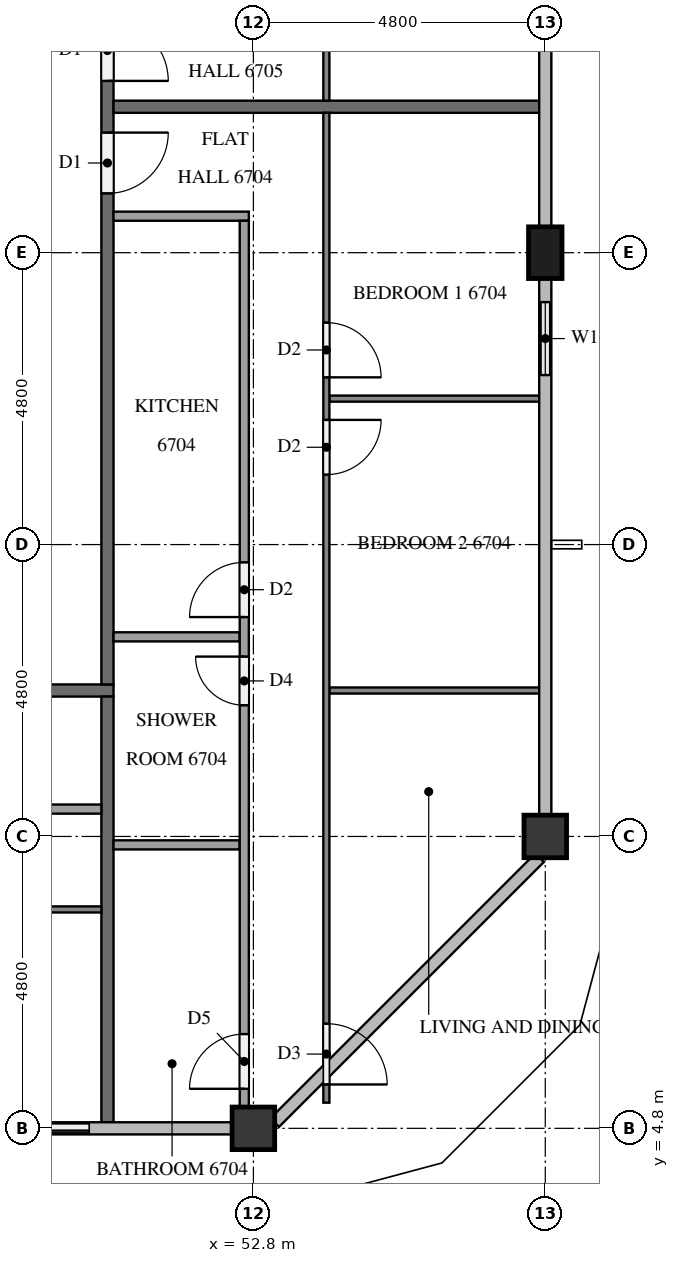
"""IFC4 building model, lengths in metres.
Left out: names, types, materials, properties, quantities, classifications, styles, units other than length and angle.
Written with IfcOpenShell. Run it as: python <this file> out.ifc"""

import sys

from ifc_helpers import new_model, si_unit, direction, frame, frame_2d, origin, origin_2d, place, context, subcontext, project, spatial, rectangle, extrude, element, fill, save


model = new_model("IFC4")
c1 = context("Model", 3, precision=1e-05, world=origin(), true_north=direction((0.0, 1.0)))
c2 = subcontext(c1, "Body", "Model", "MODEL_VIEW")
j1 = project(units=[si_unit("LENGTHUNIT", "METRE"), si_unit("PLANEANGLEUNIT", "RADIAN")], contexts=[c1])
p1 = place(None, origin())
s1 = spatial("IfcSite", under=j1, at=p1, CompositionType="ELEMENT")
p2 = place(p1, origin())
s2 = spatial("IfcBuilding", under=s1, at=p2, CompositionType="ELEMENT")
p3 = place(p2, frame((0.0, 0.0, 256.2)))
s3 = spatial("IfcBuildingStorey", under=s2, at=p3, CompositionType="ELEMENT", Elevation=256.2)
for number, where, z_axis, x_axis in (
    (1, (52.8, 4.8, 0.0), (0.0, 0.0, 1.0), (1.0, 0.0, 0.0)),
    (2, (57.6, 9.6, 0.0), (0.0, 0.0, 1.0), (1.0, 0.0, 0.0)),
):
    element("IfcColumn", number, at=place(p3, frame(where, z_axis=z_axis, x_axis=x_axis)), inside=s3, PredefinedType="COLUMN", context=c2, shape_type="SweptSolid", body=[
        extrude(rectangle(XDim=0.7, YDim=0.7, at=origin_2d()), origin(), (0.0, 0.0, 1.0), 3.2),
    ])
p4 = place(p3, frame((57.6, 19.2, 0.0), z_axis=(0.0, 0.0, 1.0), x_axis=(0.0, 1.0, 0.0)))
e3 = element("IfcColumn", 3, at=p4, inside=s3, PredefinedType="COLUMN", context=c2, shape_type="SweptSolid", body=[
    extrude(rectangle(XDim=0.85, YDim=0.55, at=origin_2d()), origin(), (0.0, 0.0, 1.0), 3.2),
])
p5 = place(p3, frame((48.0, 4.8, 0.0), z_axis=(0.0, 0.0, 1.0), x_axis=(1.0, 0.0, 0.0)))
e4 = element("IfcWall", 4, at=p5, inside=s3, PredefinedType="SOLIDWALL", context=c2, shape_type="SweptSolid", body=[
    extrude(rectangle(XDim=2.4, YDim=0.15, at=frame_2d((1.2, 0.0))), origin(), (0.0, 0.0, 1.0), 3.2),
])
p6 = place(p5, frame((0.3, 0.0, 0.0)))
e5 = element("IfcOpeningElement", 5, at=p6, cuts=e4, PredefinedType="OPENING", context=c2, shape_type="SweptSolid", body=[
    extrude(rectangle(XDim=1.8, YDim=2.4, at=frame_2d((0.9, 1.2))), frame((0.0, 0.085, 0.0), z_axis=(0.0, -1.0, 0.0), x_axis=(1.0, 0.0, 0.0)), (0.0, 0.0, 1.0), 0.17),
])
p7 = place(p3, frame((57.6, 16.8, 0.0), z_axis=(0.0, 0.0, 1.0), x_axis=(0.0, 1.0, 0.0)))
e6 = element("IfcWall", 6, at=p7, inside=s3, PredefinedType="SOLIDWALL", context=c2, shape_type="SweptSolid", body=[
    extrude(rectangle(XDim=1.975, YDim=0.15, at=frame_2d((0.987, 0.0))), origin(), (0.0, 0.0, 1.0), 3.2),
])
p8 = place(p7, frame((0.387, 0.0, 0.9)))
e7 = element("IfcOpeningElement", 7, at=p8, cuts=e6, PredefinedType="OPENING", context=c2, shape_type="SweptSolid", body=[
    extrude(rectangle(XDim=1.2, YDim=1.4, at=frame_2d((0.6, 0.7))), frame((0.0, 0.085, 0.0), z_axis=(0.0, -1.0, 0.0), x_axis=(1.0, 0.0, 0.0)), (0.0, 0.0, 1.0), 0.17),
])
p9 = place(p3, frame((50.5, 12.0, 0.0), z_axis=(0.0, 0.0, 1.0), x_axis=(-1.0, 0.0, 0.0)))
e8 = element("IfcWall", 8, at=p9, inside=s3, PredefinedType="PARTITIONING", context=c2, shape_type="SweptSolid", body=[
    extrude(rectangle(XDim=38.6, YDim=0.2, at=frame_2d((19.3, 0.0))), origin(), (0.0, 0.0, 1.0), 3.2),
])
p10 = place(p9, frame((37.075, 0.0, 0.0)))
e9 = element("IfcOpeningElement", 9, at=p10, cuts=e8, PredefinedType="OPENING", context=c2, shape_type="SweptSolid", body=[
    extrude(rectangle(XDim=1.0, YDim=2.1, at=frame_2d((0.5, 1.05))), frame((0.0, 0.11, 0.0), z_axis=(0.0, -1.0, 0.0), x_axis=(1.0, 0.0, 0.0)), (0.0, 0.0, 1.0), 0.22),
])
p11 = place(p9, frame((12.525, 0.0, 0.0)))
e10 = element("IfcOpeningElement", 10, at=p11, cuts=e8, PredefinedType="OPENING", context=c2, shape_type="SweptSolid", body=[
    extrude(rectangle(XDim=1.0, YDim=2.1, at=frame_2d((0.5, 1.05))), frame((0.0, 0.11, 0.0), z_axis=(0.0, -1.0, 0.0), x_axis=(1.0, 0.0, 0.0)), (0.0, 0.0, 1.0), 0.22),
])
p12 = place(p9, frame((10.675, 0.0, 0.0)))
e11 = element("IfcOpeningElement", 11, at=p12, cuts=e8, PredefinedType="OPENING", context=c2, shape_type="SweptSolid", body=[
    extrude(rectangle(XDim=1.0, YDim=2.1, at=frame_2d((0.5, 1.05))), frame((0.0, 0.11, 0.0), z_axis=(0.0, -1.0, 0.0), x_axis=(1.0, 0.0, 0.0)), (0.0, 0.0, 1.0), 0.22),
])
p13 = place(p3, frame((50.4, 40.7, 0.0), z_axis=(0.0, 0.0, 1.0), x_axis=(0.0, -1.0, 0.0)))
e12 = element("IfcWall", 12, at=p13, inside=s3, PredefinedType="PARTITIONING", context=c2, shape_type="SweptSolid", body=[
    extrude(rectangle(XDim=28.6, YDim=0.2, at=frame_2d((14.3, 0.0))), origin(), (0.0, 0.0, 1.0), 3.2),
])
p14 = place(p13, frame((19.525, 0.0, 0.0)))
e13 = element("IfcOpeningElement", 13, at=p14, cuts=e12, PredefinedType="OPENING", context=c2, shape_type="SweptSolid", body=[
    extrude(rectangle(XDim=1.0, YDim=2.1, at=frame_2d((0.5, 1.05))), frame((0.0, 0.11, 0.0), z_axis=(0.0, -1.0, 0.0), x_axis=(1.0, 0.0, 0.0)), (0.0, 0.0, 1.0), 0.22),
])
p15 = place(p13, frame((17.675, 0.0, 0.0)))
e14 = element("IfcOpeningElement", 14, at=p15, cuts=e12, PredefinedType="OPENING", context=c2, shape_type="SweptSolid", body=[
    extrude(rectangle(XDim=1.0, YDim=2.1, at=frame_2d((0.5, 1.05))), frame((0.0, 0.11, 0.0), z_axis=(0.0, -1.0, 0.0), x_axis=(1.0, 0.0, 0.0)), (0.0, 0.0, 1.0), 0.22),
])
p16 = place(p13, frame((0.325, 0.0, 0.0)))
e15 = element("IfcOpeningElement", 15, at=p16, cuts=e12, PredefinedType="OPENING", context=c2, shape_type="SweptSolid", body=[
    extrude(rectangle(XDim=1.0, YDim=2.1, at=frame_2d((0.5, 1.05))), frame((0.0, 0.11, 0.0), z_axis=(0.0, -1.0, 0.0), x_axis=(1.0, 0.0, 0.0)), (0.0, 0.0, 1.0), 0.22),
])
for number, where, z_axis, x_axis in (
    (16, (50.4, 11.9, 0.0), (0.0, 0.0, 1.0), (0.0, -1.0, 0.0)),
    (17, (50.5, 21.6, 0.0), (0.0, 0.0, 1.0), (1.0, 0.0, 0.0)),
):
    element("IfcWall", number, at=place(p3, frame(where, z_axis=z_axis, x_axis=x_axis)), inside=s3, PredefinedType="PARTITIONING", context=c2, shape_type="SweptSolid", body=[
        extrude(rectangle(XDim=7.0, YDim=0.2, at=frame_2d((3.5, 0.0))), origin(), (0.0, 0.0, 1.0), 3.2),
    ])
p17 = place(p3, frame((50.3, 8.4, 0.0), z_axis=(0.0, 0.0, 1.0), x_axis=(-1.0, 0.0, 0.0)))
e18 = element("IfcWall", 18, at=p17, inside=s3, PredefinedType="PARTITIONING", context=c2, shape_type="SweptSolid", body=[
    extrude(rectangle(XDim=11.8, YDim=0.1, at=frame_2d((5.9, 0.0))), origin(), (0.0, 0.0, 1.0), 3.2),
])
p18 = place(p17, frame((7.45, 0.0, 0.0)))
e19 = element("IfcOpeningElement", 19, at=p18, cuts=e18, PredefinedType="OPENING", context=c2, shape_type="SweptSolid", body=[
    extrude(rectangle(XDim=0.9, YDim=2.1, at=frame_2d((0.45, 1.05))), frame((0.0, 0.06, 0.0), z_axis=(0.0, -1.0, 0.0), x_axis=(1.0, 0.0, 0.0)), (0.0, 0.0, 1.0), 0.12),
])
p19 = place(p17, frame((5.75, 0.0, 0.0)))
e20 = element("IfcOpeningElement", 20, at=p19, cuts=e18, PredefinedType="OPENING", context=c2, shape_type="SweptSolid", body=[
    extrude(rectangle(XDim=1.0, YDim=2.1, at=frame_2d((0.5, 1.05))), frame((0.0, 0.06, 0.0), z_axis=(0.0, -1.0, 0.0), x_axis=(1.0, 0.0, 0.0)), (0.0, 0.0, 1.0), 0.12),
])
p20 = place(p3, frame((40.275, 10.05, 0.0), z_axis=(0.0, 0.0, 1.0), x_axis=(1.0, 0.0, 0.0)))
e21 = element("IfcWall", 21, at=p20, inside=s3, PredefinedType="PARTITIONING", context=c2, shape_type="SweptSolid", body=[
    extrude(rectangle(XDim=10.025, YDim=0.15, at=frame_2d((5.013, 0.0))), origin(), (0.0, 0.0, 1.0), 3.2),
])
p21 = place(p20, frame((2.885, 0.0, 0.0)))
e22 = element("IfcOpeningElement", 22, at=p21, cuts=e21, PredefinedType="OPENING", context=c2, shape_type="SweptSolid", body=[
    extrude(rectangle(XDim=0.8, YDim=2.1, at=frame_2d((0.4, 1.05))), frame((0.0, 0.085, 0.0), z_axis=(0.0, -1.0, 0.0), x_axis=(1.0, 0.0, 0.0)), (0.0, 0.0, 1.0), 0.17),
])
p22 = place(p20, frame((4.335, 0.0, 0.0)))
e23 = element("IfcOpeningElement", 23, at=p22, cuts=e21, PredefinedType="OPENING", context=c2, shape_type="SweptSolid", body=[
    extrude(rectangle(XDim=0.9, YDim=2.1, at=frame_2d((0.45, 1.05))), frame((0.0, 0.085, 0.0), z_axis=(0.0, -1.0, 0.0), x_axis=(1.0, 0.0, 0.0)), (0.0, 0.0, 1.0), 0.17),
])
for number, where, z_axis, x_axis in (
    (24, (54.05, 16.8, 0.0), (0.0, 0.0, 1.0), (1.0, 0.0, 0.0)),
    (25, (54.05, 12.0, 0.0), (0.0, 0.0, 1.0), (1.0, 0.0, 0.0)),
):
    element("IfcWall", number, at=place(p3, frame(where, z_axis=z_axis, x_axis=x_axis)), inside=s3, PredefinedType="PARTITIONING", context=c2, shape_type="SweptSolid", body=[
        extrude(rectangle(XDim=3.45, YDim=0.1, at=frame_2d((1.725, 0.0))), origin(), (0.0, 0.0, 1.0), 3.2),
    ])
p23 = place(p3, frame((54.0, 21.5, 0.0), z_axis=(0.0, 0.0, 1.0), x_axis=(0.0, -1.0, 0.0)))
e26 = element("IfcWall", 26, at=p23, inside=s3, PredefinedType="PARTITIONING", context=c2, shape_type="SweptSolid", body=[
    extrude(rectangle(XDim=16.279, YDim=0.1, at=frame_2d((8.139, 0.0))), origin(), (0.0, 0.0, 1.0), 3.2),
])
p24 = place(p23, frame((3.45, 0.0, 0.0)))
e27 = element("IfcOpeningElement", 27, at=p24, cuts=e26, PredefinedType="OPENING", context=c2, shape_type="SweptSolid", body=[
    extrude(rectangle(XDim=0.9, YDim=2.1, at=frame_2d((0.45, 1.05))), frame((0.0, 0.06, 0.0), z_axis=(0.0, -1.0, 0.0), x_axis=(1.0, 0.0, 0.0)), (0.0, 0.0, 1.0), 0.12),
])
p25 = place(p23, frame((5.05, 0.0, 0.0)))
e28 = element("IfcOpeningElement", 28, at=p25, cuts=e26, PredefinedType="OPENING", context=c2, shape_type="SweptSolid", body=[
    extrude(rectangle(XDim=0.9, YDim=2.1, at=frame_2d((0.45, 1.05))), frame((0.0, 0.06, 0.0), z_axis=(0.0, -1.0, 0.0), x_axis=(1.0, 0.0, 0.0)), (0.0, 0.0, 1.0), 0.12),
])
p26 = place(p23, frame((14.979, 0.0, 0.0)))
e29 = element("IfcOpeningElement", 29, at=p26, cuts=e26, PredefinedType="OPENING", context=c2, shape_type="SweptSolid", body=[
    extrude(rectangle(XDim=1.0, YDim=2.1, at=frame_2d((0.5, 1.05))), frame((0.0, 0.06, 0.0), z_axis=(0.0, -1.0, 0.0), x_axis=(1.0, 0.0, 0.0)), (0.0, 0.0, 1.0), 0.12),
])
for number, where, z_axis, x_axis in (
    (30, (50.5, 12.883, 0.0), (0.0, 0.0, 1.0), (1.0, 0.0, 0.0)),
    (31, (50.5, 9.461, 0.0), (0.0, 0.0, 1.0), (1.0, 0.0, 0.0)),
):
    element("IfcWall", number, at=place(p3, frame(where, z_axis=z_axis, x_axis=x_axis)), inside=s3, PredefinedType="PARTITIONING", context=c2, shape_type="SweptSolid", body=[
        extrude(rectangle(XDim=2.075, YDim=0.15, at=frame_2d((1.038, 0.0))), origin(), (0.0, 0.0, 1.0), 3.2),
    ])
p27 = place(p3, frame((50.5, 19.8, 0.0), z_axis=(0.0, 0.0, 1.0), x_axis=(1.0, 0.0, 0.0)))
e32 = element("IfcWall", 32, at=p27, inside=s3, PredefinedType="PARTITIONING", context=c2, shape_type="SweptSolid", body=[
    extrude(rectangle(XDim=2.225, YDim=0.15, at=frame_2d((1.113, 0.0))), origin(), (0.0, 0.0, 1.0), 3.2),
])
p28 = place(p3, frame((52.65, 5.15, 0.0), z_axis=(0.0, 0.0, 1.0), x_axis=(0.0, 1.0, 0.0)))
e33 = element("IfcWall", 33, at=p28, inside=s3, PredefinedType="PARTITIONING", context=c2, shape_type="SweptSolid", body=[
    extrude(rectangle(XDim=14.575, YDim=0.15, at=frame_2d((7.288, 0.0))), origin(), (0.0, 0.0, 1.0), 3.2),
])
p29 = place(p28, frame((8.058, 0.0, 0.0)))
e34 = element("IfcOpeningElement", 34, at=p29, cuts=e33, PredefinedType="OPENING", context=c2, shape_type="SweptSolid", body=[
    extrude(rectangle(XDim=0.9, YDim=2.1, at=frame_2d((0.45, 1.05))), frame((0.0, 0.085, 0.0), z_axis=(0.0, -1.0, 0.0), x_axis=(1.0, 0.0, 0.0)), (0.0, 0.0, 1.0), 0.17),
])
p30 = place(p28, frame((6.608, 0.0, 0.0)))
e35 = element("IfcOpeningElement", 35, at=p30, cuts=e33, PredefinedType="OPENING", context=c2, shape_type="SweptSolid", body=[
    extrude(rectangle(XDim=0.8, YDim=2.1, at=frame_2d((0.4, 1.05))), frame((0.0, 0.085, 0.0), z_axis=(0.0, -1.0, 0.0), x_axis=(1.0, 0.0, 0.0)), (0.0, 0.0, 1.0), 0.17),
])
p31 = place(p28, frame((0.3, 0.0, 0.0)))
e36 = element("IfcOpeningElement", 36, at=p31, cuts=e33, PredefinedType="OPENING", context=c2, shape_type="SweptSolid", body=[
    extrude(rectangle(XDim=0.9, YDim=2.1, at=frame_2d((0.45, 1.05))), frame((0.0, 0.085, 0.0), z_axis=(0.0, -1.0, 0.0), x_axis=(1.0, 0.0, 0.0)), (0.0, 0.0, 1.0), 0.17),
])
p32 = place(p3, frame((54.0, 31.1, 0.0), z_axis=(0.0, 0.0, 1.0), x_axis=(0.0, -1.0, 0.0)))
e37 = element("IfcWall", 37, at=p32, inside=s3, PredefinedType="PARTITIONING", context=c2, shape_type="SweptSolid", body=[
    extrude(rectangle(XDim=9.4, YDim=0.1, at=frame_2d((4.7, 0.0))), origin(), (0.0, 0.0, 1.0), 3.2),
])
p33 = place(p32, frame((5.05, 0.0, 0.0)))
e38 = element("IfcOpeningElement", 38, at=p33, cuts=e37, PredefinedType="OPENING", context=c2, shape_type="SweptSolid", body=[
    extrude(rectangle(XDim=1.0, YDim=2.1, at=frame_2d((0.5, 1.05))), frame((0.0, 0.06, 0.0), z_axis=(0.0, -1.0, 0.0), x_axis=(1.0, 0.0, 0.0)), (0.0, 0.0, 1.0), 0.12),
])
p34 = place(p32, frame((3.45, 0.0, 0.0)))
e39 = element("IfcOpeningElement", 39, at=p34, cuts=e37, PredefinedType="OPENING", context=c2, shape_type="SweptSolid", body=[
    extrude(rectangle(XDim=0.9, YDim=2.1, at=frame_2d((0.45, 1.05))), frame((0.0, 0.06, 0.0), z_axis=(0.0, -1.0, 0.0), x_axis=(1.0, 0.0, 0.0)), (0.0, 0.0, 1.0), 0.12),
])
p35 = place(p6, origin())
e40 = element("IfcDoor", 40, at=p35, inside=s3, OperationType="SLIDING_TO_RIGHT", PredefinedType="DOOR", context=c2, shape_type="SweptSolid", body=[
    extrude(rectangle(XDim=1.8, YDim=2.4, at=frame_2d((0.9, 1.2))), frame((0.0, 0.025, 0.0), z_axis=(0.0, -1.0, 0.0), x_axis=(1.0, 0.0, 0.0)), (0.0, 0.0, 1.0), 0.05),
])
fill(e5, e40)
p36 = place(p8, origin())
e41 = element("IfcWindow", 41, at=p36, inside=s3, PartitioningType="SINGLE_PANEL", PredefinedType="WINDOW", context=c2, shape_type="SweptSolid", body=[
    extrude(rectangle(XDim=1.2, YDim=1.4, at=frame_2d((0.6, 0.7))), frame((0.0, 0.03, 0.0), z_axis=(0.0, -1.0, 0.0), x_axis=(1.0, 0.0, 0.0)), (0.0, 0.0, 1.0), 0.06),
])
fill(e7, e41)
p37 = place(p14, origin())
e42 = element("IfcDoor", 42, at=p37, inside=s3, OperationType="SINGLE_SWING_LEFT", PredefinedType="DOOR", context=c2, shape_type="SweptSolid", body=[
    extrude(rectangle(XDim=1.0, YDim=2.1, at=frame_2d((0.5, 1.05))), frame((0.0, 0.025, 0.0), z_axis=(0.0, -1.0, 0.0), x_axis=(1.0, 0.0, 0.0)), (0.0, 0.0, 1.0), 0.05),
])
fill(e13, e42)
p38 = place(p15, origin())
e43 = element("IfcDoor", 43, at=p38, inside=s3, OperationType="SINGLE_SWING_RIGHT", PredefinedType="DOOR", context=c2, shape_type="SweptSolid", body=[
    extrude(rectangle(XDim=1.0, YDim=2.1, at=frame_2d((0.5, 1.05))), frame((0.0, 0.025, 0.0), z_axis=(0.0, -1.0, 0.0), x_axis=(1.0, 0.0, 0.0)), (0.0, 0.0, 1.0), 0.05),
])
fill(e14, e43)
p39 = place(p24, origin())
e44 = element("IfcDoor", 44, at=p39, inside=s3, OperationType="SINGLE_SWING_RIGHT", PredefinedType="DOOR", context=c2, shape_type="SweptSolid", body=[
    extrude(rectangle(XDim=0.9, YDim=2.1, at=frame_2d((0.45, 1.05))), frame((0.0, 0.025, 0.0), z_axis=(0.0, -1.0, 0.0), x_axis=(1.0, 0.0, 0.0)), (0.0, 0.0, 1.0), 0.05),
])
fill(e27, e44)
p40 = place(p25, origin())
e45 = element("IfcDoor", 45, at=p40, inside=s3, OperationType="SINGLE_SWING_LEFT", PredefinedType="DOOR", context=c2, shape_type="SweptSolid", body=[
    extrude(rectangle(XDim=0.9, YDim=2.1, at=frame_2d((0.45, 1.05))), frame((0.0, 0.025, 0.0), z_axis=(0.0, -1.0, 0.0), x_axis=(1.0, 0.0, 0.0)), (0.0, 0.0, 1.0), 0.05),
])
fill(e28, e45)
p41 = place(p26, origin())
e46 = element("IfcDoor", 46, at=p41, inside=s3, OperationType="SINGLE_SWING_RIGHT", PredefinedType="DOOR", context=c2, shape_type="SweptSolid", body=[
    extrude(rectangle(XDim=1.0, YDim=2.1, at=frame_2d((0.5, 1.05))), frame((0.0, 0.025, 0.0), z_axis=(0.0, -1.0, 0.0), x_axis=(1.0, 0.0, 0.0)), (0.0, 0.0, 1.0), 0.05),
])
fill(e29, e46)
p42 = place(p29, origin())
e47 = element("IfcDoor", 47, at=p42, inside=s3, OperationType="SINGLE_SWING_LEFT", PredefinedType="DOOR", context=c2, shape_type="SweptSolid", body=[
    extrude(rectangle(XDim=0.9, YDim=2.1, at=frame_2d((0.45, 1.05))), frame((0.0, 0.025, 0.0), z_axis=(0.0, -1.0, 0.0), x_axis=(1.0, 0.0, 0.0)), (0.0, 0.0, 1.0), 0.05),
])
fill(e34, e47)
p43 = place(p30, origin())
e48 = element("IfcDoor", 48, at=p43, inside=s3, OperationType="SINGLE_SWING_RIGHT", PredefinedType="DOOR", context=c2, shape_type="SweptSolid", body=[
    extrude(rectangle(XDim=0.8, YDim=2.1, at=frame_2d((0.4, 1.05))), frame((0.0, 0.025, 0.0), z_axis=(0.0, -1.0, 0.0), x_axis=(1.0, 0.0, 0.0)), (0.0, 0.0, 1.0), 0.05),
])
fill(e35, e48)
p44 = place(p31, origin())
e49 = element("IfcDoor", 49, at=p44, inside=s3, OperationType="SINGLE_SWING_LEFT", PredefinedType="DOOR", context=c2, shape_type="SweptSolid", body=[
    extrude(rectangle(XDim=0.9, YDim=2.1, at=frame_2d((0.45, 1.05))), frame((0.0, 0.025, 0.0), z_axis=(0.0, -1.0, 0.0), x_axis=(1.0, 0.0, 0.0)), (0.0, 0.0, 1.0), 0.05),
])
fill(e36, e49)
save(model, sys.argv[1])
